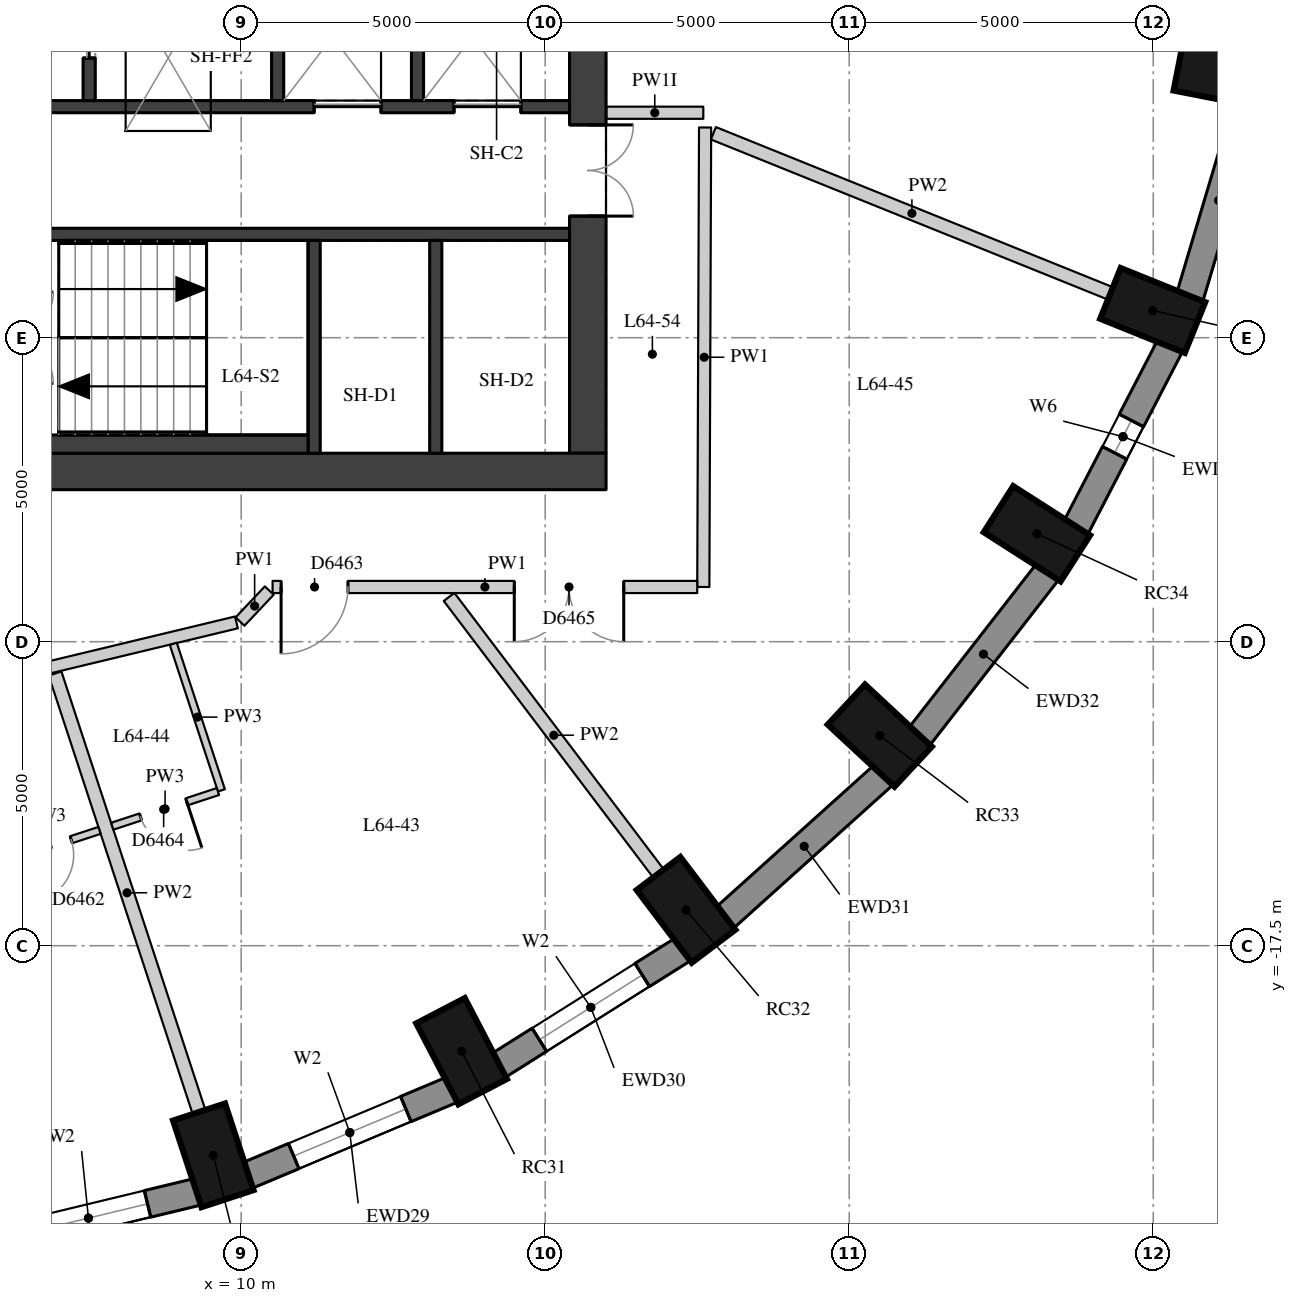
"""IFC4 building model, lengths in metres.
Left out: names, types, materials, properties, quantities, classifications, styles, units other than length and angle.
Written with IfcOpenShell. Run it as: python <this file> out.ifc"""

import sys

from ifc_helpers import new_model, si_unit, direction, frame, frame_2d, origin, origin_2d, place, context, subcontext, project, spatial, rectangle, extrude, element, fill, save


model = new_model("IFC4")
c1 = context("Model", 3, precision=1e-05, world=origin(), true_north=direction((0.0, 1.0)))
c2 = subcontext(c1, "Body", "Model", "MODEL_VIEW")
j1 = project(units=[si_unit("LENGTHUNIT", "METRE"), si_unit("PLANEANGLEUNIT", "RADIAN")], contexts=[c1])
p1 = place(None, origin())
s1 = spatial("IfcSite", under=j1, at=p1, CompositionType="ELEMENT")
p2 = place(p1, origin())
s2 = spatial("IfcBuilding", under=s1, at=p2, CompositionType="ELEMENT")
p3 = place(p2, frame((0.0, 0.0, 225.5)))
s3 = spatial("IfcBuildingStorey", under=s2, at=p3, CompositionType="ELEMENT", Elevation=225.5)
for number, where, z_axis, x_axis in (
    (1, (9.541, -20.948, 0.0), (0.0, 0.0, 1.0), (0.312, -0.95, 0.0)),
    (2, (13.625, -19.235, 0.0), (0.0, 0.0, 1.0), (0.462, -0.887, 0.0)),
    (3, (17.316, -16.911, 0.0), (0.0, 0.0, 1.0), (0.604, -0.797, 0.0)),
    (4, (20.502, -14.045, 0.0), (0.0, 0.0, 1.0), (0.732, -0.681, 0.0)),
    (5, (23.087, -10.725, 0.0), (0.0, 0.0, 1.0), (0.842, -0.539, 0.0)),
    (6, (24.991, -7.052, 0.0), (0.0, 0.0, 1.0), (0.927, -0.374, 0.0)),
    (7, (26.157, -3.137, 0.0), (0.0, 0.0, 1.0), (0.981, -0.192, 0.0)),
):
    element("IfcColumn", number, at=place(p3, frame(where, z_axis=z_axis, x_axis=x_axis)), inside=s3, PredefinedType="COLUMN", context=c2, shape_type="SweptSolid", body=[
        extrude(rectangle(XDim=1.5, YDim=0.9, at=origin_2d()), origin(), (0.0, 0.0, 1.0), 3.3),
    ])
p4 = place(p3, frame((5.691, -22.414, 0.0), z_axis=(0.0, 0.0, 1.0), x_axis=(0.9721584944, 0.234324266275, 0.0)))
e8 = element("IfcWall", 8, at=p4, inside=s3, PredefinedType="SOLIDWALL", context=c2, shape_type="SweptSolid", body=[
    extrude(rectangle(XDim=3.698, YDim=0.45, at=frame_2d((1.849, 0.0))), origin(), (0.0, 0.0, 1.0), 2.85),
])
p5 = place(p4, frame((0.849, 0.0, 0.4)))
e9 = element("IfcOpeningElement", 9, at=p5, cuts=e8, PredefinedType="OPENING", context=c2, shape_type="SweptSolid", body=[
    extrude(rectangle(XDim=2.0, YDim=1.75, at=frame_2d((1.0, 0.875))), frame((0.0, 0.235, 0.0), z_axis=(0.0, -1.0, 0.0), x_axis=(1.0, 0.0, 0.0)), (0.0, 0.0, 1.0), 0.47),
])
p6 = place(p3, frame((10.103, -21.279, 0.0), z_axis=(0.0, 0.0, 1.0), x_axis=(0.922168222612, 0.386789050006, 0.0)))
e10 = element("IfcWall", 10, at=p6, inside=s3, PredefinedType="SOLIDWALL", context=c2, shape_type="SweptSolid", body=[
    extrude(rectangle(XDim=3.651, YDim=0.45, at=frame_2d((1.825, 0.0))), origin(), (0.0, 0.0, 1.0), 2.85),
])
p7 = place(p6, frame((0.825, 0.0, 0.4)))
e11 = element("IfcOpeningElement", 11, at=p7, cuts=e10, PredefinedType="OPENING", context=c2, shape_type="SweptSolid", body=[
    extrude(rectangle(XDim=2.0, YDim=1.75, at=frame_2d((1.0, 0.875))), frame((0.0, 0.235, 0.0), z_axis=(0.0, -1.0, 0.0), x_axis=(1.0, 0.0, 0.0)), (0.0, 0.0, 1.0), 0.47),
])
p8 = place(p3, frame((14.232, -19.47, 0.0), z_axis=(0.0, 0.0, 1.0), x_axis=(0.84614984472, 0.532945063098, 0.0)))
e12 = element("IfcWall", 12, at=p8, inside=s3, PredefinedType="SOLIDWALL", context=c2, shape_type="SweptSolid", body=[
    extrude(rectangle(XDim=3.586, YDim=0.45, at=frame_2d((1.793, 0.0))), origin(), (0.0, 0.0, 1.0), 2.85),
])
p9 = place(p8, frame((0.793, 0.0, 0.4)))
e13 = element("IfcOpeningElement", 13, at=p9, cuts=e12, PredefinedType="OPENING", context=c2, shape_type="SweptSolid", body=[
    extrude(rectangle(XDim=2.0, YDim=1.75, at=frame_2d((1.0, 0.875))), frame((0.0, 0.235, 0.0), z_axis=(0.0, -1.0, 0.0), x_axis=(1.0, 0.0, 0.0)), (0.0, 0.0, 1.0), 0.47),
])
p10 = place(p3, frame((17.953, -17.04, 0.0), z_axis=(0.0, 0.0, 1.0), x_axis=(0.743442727602, 0.668799604348, 0.0)))
e14 = element("IfcWall", 14, at=p10, inside=s3, PredefinedType="SOLIDWALL", context=c2, shape_type="SweptSolid", body=[
    extrude(rectangle(XDim=3.513, YDim=0.45, at=frame_2d((1.756, 0.0))), origin(), (0.0, 0.0, 1.0), 2.85),
])
p11 = place(p3, frame((21.151, -14.061, 0.0), z_axis=(0.0, 0.0, 1.0), x_axis=(0.614255239631, 0.789107407509, 0.0)))
e15 = element("IfcWall", 15, at=p11, inside=s3, PredefinedType="SOLIDWALL", context=c2, shape_type="SweptSolid", body=[
    extrude(rectangle(XDim=3.438, YDim=0.45, at=frame_2d((1.719, 0.0))), origin(), (0.0, 0.0, 1.0), 2.85),
])
p12 = place(p3, frame((23.727, -10.624, 0.0), z_axis=(0.0, 0.0, 1.0), x_axis=(0.460175500475, 0.887827972505, 0.0)))
e16 = element("IfcWall", 16, at=p12, inside=s3, PredefinedType="SOLIDWALL", context=c2, shape_type="SweptSolid", body=[
    extrude(rectangle(XDim=3.371, YDim=0.45, at=frame_2d((1.685, 0.0))), origin(), (0.0, 0.0, 1.0), 2.85),
])
p13 = place(p12, frame((1.385, 0.0, 0.4)))
e17 = element("IfcOpeningElement", 17, at=p13, cuts=e16, PredefinedType="OPENING", context=c2, shape_type="SweptSolid", body=[
    extrude(rectangle(XDim=0.6, YDim=1.75, at=frame_2d((0.3, 0.875))), frame((0.0, 0.235, 0.0), z_axis=(0.0, -1.0, 0.0), x_axis=(1.0, 0.0, 0.0)), (0.0, 0.0, 1.0), 0.47),
])
p14 = place(p3, frame((25.6, -6.834, 0.0), z_axis=(0.0, 0.0, 1.0), x_axis=(0.285444972963, 0.958395099847, 0.0)))
e18 = element("IfcWall", 18, at=p14, inside=s3, PredefinedType="SOLIDWALL", context=c2, shape_type="SweptSolid", body=[
    extrude(rectangle(XDim=3.32, YDim=0.45, at=frame_2d((1.66, 0.0))), origin(), (0.0, 0.0, 1.0), 2.85),
])
p15 = place(p3, frame((15.7, -9.4, 0.0), z_axis=(0.0, 0.0, 1.0), x_axis=(0.0, 1.0, 0.0)))
e19 = element("IfcWall", 19, at=p15, inside=s3, PredefinedType="SHEAR", context=c2, shape_type="SweptSolid", body=[
    extrude(rectangle(XDim=18.8, YDim=0.6, at=frame_2d((9.4, 0.0))), origin(), (0.0, 0.0, 1.0), 2.85),
])
p16 = place(p15, frame((13.4, 0.0, 0.0)))
e20 = element("IfcOpeningElement", 20, at=p16, cuts=e19, PredefinedType="OPENING", context=c2, shape_type="SweptSolid", body=[
    extrude(rectangle(XDim=1.5, YDim=2.1, at=frame_2d((0.75, 1.05))), frame((0.0, 0.31, 0.0), z_axis=(0.0, -1.0, 0.0), x_axis=(1.0, 0.0, 0.0)), (0.0, 0.0, 1.0), 0.62),
])
p17 = place(p15, frame((3.9, 0.0, 0.0)))
e21 = element("IfcOpeningElement", 21, at=p17, cuts=e19, PredefinedType="OPENING", context=c2, shape_type="SweptSolid", body=[
    extrude(rectangle(XDim=1.5, YDim=2.1, at=frame_2d((0.75, 1.05))), frame((0.0, 0.31, 0.0), z_axis=(0.0, -1.0, 0.0), x_axis=(1.0, 0.0, 0.0)), (0.0, 0.0, 1.0), 0.62),
])
p18 = place(p3, frame((4.0, -9.7, 0.0), z_axis=(0.0, 0.0, 1.0), x_axis=(1.0, 0.0, 0.0)))
e22 = element("IfcWall", 22, at=p18, inside=s3, PredefinedType="SHEAR", context=c2, shape_type="SweptSolid", body=[
    extrude(rectangle(XDim=12.0, YDim=0.6, at=frame_2d((6.0, 0.0))), origin(), (0.0, 0.0, 1.0), 2.85),
])
p19 = place(p3, frame((4.6, -3.7, 0.0), z_axis=(0.0, 0.0, 1.0), x_axis=(1.0, 0.0, 0.0)))
e23 = element("IfcWall", 23, at=p19, inside=s3, PredefinedType="SHEAR", context=c2, shape_type="SweptSolid", body=[
    extrude(rectangle(XDim=10.8, YDim=0.2, at=frame_2d((5.4, 0.0))), origin(), (0.0, 0.0, 1.0), 2.85),
])
p20 = place(p19, frame((6.6, 0.0, 0.0)))
e24 = element("IfcOpeningElement", 24, at=p20, cuts=e23, PredefinedType="OPENING", context=c2, shape_type="SweptSolid", body=[
    extrude(rectangle(XDim=1.1, YDim=2.1, at=frame_2d((0.55, 1.05))), frame((0.0, 0.11, 0.0), z_axis=(0.0, -1.0, 0.0), x_axis=(1.0, 0.0, 0.0)), (0.0, 0.0, 1.0), 0.22),
])
p21 = place(p19, frame((8.9, 0.0, 0.0)))
e25 = element("IfcOpeningElement", 25, at=p21, cuts=e23, PredefinedType="OPENING", context=c2, shape_type="SweptSolid", body=[
    extrude(rectangle(XDim=1.1, YDim=2.1, at=frame_2d((0.55, 1.05))), frame((0.0, 0.11, 0.0), z_axis=(0.0, -1.0, 0.0), x_axis=(1.0, 0.0, 0.0)), (0.0, 0.0, 1.0), 0.22),
])
p22 = place(p3, frame((4.6, -5.8, 0.0), z_axis=(0.0, 0.0, 1.0), x_axis=(1.0, 0.0, 0.0)))
e26 = element("IfcWall", 26, at=p22, inside=s3, PredefinedType="SHEAR", context=c2, shape_type="SweptSolid", body=[
    extrude(rectangle(XDim=10.8, YDim=0.2, at=frame_2d((5.4, 0.0))), origin(), (0.0, 0.0, 1.0), 2.85),
])
for number, where, z_axis, x_axis in (
    (27, (11.2, -9.4, 0.0), (0.0, 0.0, 1.0), (0.0, 1.0, 0.0)),
    (28, (13.2, -9.4, 0.0), (0.0, 0.0, 1.0), (0.0, 1.0, 0.0)),
):
    element("IfcWall", number, at=place(p3, frame(where, z_axis=z_axis, x_axis=x_axis)), inside=s3, PredefinedType="SHEAR", context=c2, shape_type="SweptSolid", body=[
        extrude(rectangle(XDim=3.5, YDim=0.2, at=frame_2d((1.75, 0.0))), origin(), (0.0, 0.0, 1.0), 2.85),
    ])
p23 = place(p3, frame((7.5, -3.6, 0.0), z_axis=(0.0, 0.0, 1.0), x_axis=(0.0, 1.0, 0.0)))
e29 = element("IfcWall", 29, at=p23, inside=s3, PredefinedType="SHEAR", context=c2, shape_type="SweptSolid", body=[
    extrude(rectangle(XDim=2.5, YDim=0.2, at=frame_2d((1.25, 0.0))), origin(), (0.0, 0.0, 1.0), 2.85),
])
p24 = place(p23, frame((0.7, 0.0, 0.0)))
e30 = element("IfcOpeningElement", 30, at=p24, cuts=e29, PredefinedType="OPENING", context=c2, shape_type="SweptSolid", body=[
    extrude(rectangle(XDim=1.1, YDim=2.1, at=frame_2d((0.55, 1.05))), frame((0.0, 0.11, 0.0), z_axis=(0.0, -1.0, 0.0), x_axis=(1.0, 0.0, 0.0)), (0.0, 0.0, 1.0), 0.22),
])
for number, where, z_axis, x_axis in (
    (31, (10.6, -3.6, 0.0), (0.0, 0.0, 1.0), (0.0, 1.0, 0.0)),
    (32, (12.9, -3.6, 0.0), (0.0, 0.0, 1.0), (0.0, 1.0, 0.0)),
):
    element("IfcWall", number, at=place(p3, frame(where, z_axis=z_axis, x_axis=x_axis)), inside=s3, PredefinedType="SHEAR", context=c2, shape_type="SweptSolid", body=[
        extrude(rectangle(XDim=2.5, YDim=0.2, at=frame_2d((1.25, 0.0))), origin(), (0.0, 0.0, 1.0), 2.85),
    ])
p25 = place(p3, frame((6.22, -9.25, 0.0), z_axis=(0.0, 0.0, 1.0), x_axis=(1.0, 0.0, 0.0)))
e33 = element("IfcWall", 33, at=p25, inside=s3, PredefinedType="PARTITIONING", context=c2, shape_type="SweptSolid", body=[
    extrude(rectangle(XDim=4.88, YDim=0.3, at=frame_2d((2.44, 0.0))), origin(), (0.0, 0.0, 1.0), 2.85),
])
p26 = place(p3, frame((17.63, -4.043, 0.0), z_axis=(0.0, 0.0, 1.0), x_axis=(-0.003908870153, -0.999992360338, 0.0)))
e34 = element("IfcWall", 34, at=p26, inside=s3, PredefinedType="PARTITIONING", context=c2, shape_type="SweptSolid", body=[
    extrude(rectangle(XDim=7.557, YDim=0.2, at=frame_2d((3.779, 0.0))), origin(), (0.0, 0.0, 1.0), 2.85),
])
p27 = place(p3, frame((17.5, -11.6, 0.0), z_axis=(0.0, 0.0, 1.0), x_axis=(-1.0, 0.0, 0.0)))
e35 = element("IfcWall", 35, at=p27, inside=s3, PredefinedType="PARTITIONING", context=c2, shape_type="SweptSolid", body=[
    extrude(rectangle(XDim=6.983, YDim=0.2, at=frame_2d((3.492, 0.0))), origin(), (0.0, 0.0, 1.0), 2.85),
])
p28 = place(p27, frame((5.743, 0.0, 0.0)))
e36 = element("IfcOpeningElement", 36, at=p28, cuts=e35, PredefinedType="OPENING", context=c2, shape_type="SweptSolid", body=[
    extrude(rectangle(XDim=1.1, YDim=2.1, at=frame_2d((0.55, 1.05))), frame((0.0, 0.11, 0.0), z_axis=(0.0, -1.0, 0.0), x_axis=(1.0, 0.0, 0.0)), (0.0, 0.0, 1.0), 0.22),
])
p29 = place(p27, frame((1.208, 0.0, 0.0)))
e37 = element("IfcOpeningElement", 37, at=p29, cuts=e35, PredefinedType="OPENING", context=c2, shape_type="SweptSolid", body=[
    extrude(rectangle(XDim=1.8, YDim=2.1, at=frame_2d((0.9, 1.05))), frame((0.0, 0.11, 0.0), z_axis=(0.0, -1.0, 0.0), x_axis=(1.0, 0.0, 0.0)), (0.0, 0.0, 1.0), 0.22),
])
p30 = place(p3, frame((10.462, -11.659, 0.0), z_axis=(0.0, 0.0, 1.0), x_axis=(-0.686265612426, -0.727351021998, 0.0)))
e38 = element("IfcWall", 38, at=p30, inside=s3, PredefinedType="PARTITIONING", context=c2, shape_type="SweptSolid", body=[
    extrude(rectangle(XDim=0.701, YDim=0.2, at=frame_2d((0.351, 0.0))), origin(), (0.0, 0.0, 1.0), 2.85),
])
p31 = place(p3, frame((9.922, -12.183, 0.0), z_axis=(0.0, 0.0, 1.0), x_axis=(-0.972292362394, -0.233768180104, 0.0)))
e39 = element("IfcWall", 39, at=p31, inside=s3, PredefinedType="PARTITIONING", context=c2, shape_type="SweptSolid", body=[
    extrude(rectangle(XDim=9.485, YDim=0.2, at=frame_2d((4.742, 0.0))), origin(), (0.0, 0.0, 1.0), 2.25),
])
p32 = place(p31, frame((8.245, 0.0, 0.0)))
e40 = element("IfcOpeningElement", 40, at=p32, cuts=e39, PredefinedType="OPENING", context=c2, shape_type="SweptSolid", body=[
    extrude(rectangle(XDim=1.1, YDim=2.1, at=frame_2d((0.55, 1.05))), frame((0.0, 0.11, 0.0), z_axis=(0.0, -1.0, 0.0), x_axis=(1.0, 0.0, 0.0)), (0.0, 0.0, 1.0), 0.22),
])
p33 = place(p3, frame((16.004, -3.8, 0.0), z_axis=(0.0, 0.0, 1.0), x_axis=(1.0, 0.0, 0.0)))
e41 = element("IfcWall", 41, at=p33, inside=s3, PredefinedType="PARTITIONING", context=c2, shape_type="SweptSolid", body=[
    extrude(rectangle(XDim=1.596, YDim=0.2, at=frame_2d((0.798, 0.0))), origin(), (0.0, 0.0, 1.0), 2.3),
])
p34 = place(p3, frame((9.307, -20.235, 0.0), z_axis=(0.0, 0.0, 1.0), x_axis=(-0.311979110549, 0.950088961404, 0.0)))
e42 = element("IfcWall", 42, at=p34, inside=s3, PredefinedType="PARTITIONING", context=c2, shape_type="SweptSolid", body=[
    extrude(rectangle(XDim=7.591, YDim=0.22, at=frame_2d((3.795, 0.0))), origin(), (0.0, 0.0, 1.0), 2.85),
])
p35 = place(p3, frame((16.863, -16.312, 0.0), z_axis=(0.0, 0.0, 1.0), x_axis=(-0.603636051313, 0.797260006243, 0.0)))
e43 = element("IfcWall", 43, at=p35, inside=s3, PredefinedType="PARTITIONING", context=c2, shape_type="SweptSolid", body=[
    extrude(rectangle(XDim=5.706, YDim=0.22, at=frame_2d((2.853, 0.0))), origin(), (0.0, 0.0, 1.0), 2.85),
])
p36 = place(p3, frame((24.295, -6.771, 0.0), z_axis=(0.0, 0.0, 1.0), x_axis=(-0.927386950843, 0.374103519639, 0.0)))
e44 = element("IfcWall", 44, at=p36, inside=s3, PredefinedType="PARTITIONING", context=c2, shape_type="SweptSolid", body=[
    extrude(rectangle(XDim=7.04, YDim=0.22, at=frame_2d((3.52, 0.0))), origin(), (0.0, 0.0, 1.0), 2.85),
])
p37 = place(p3, frame((8.884, -12.535, 0.0), z_axis=(0.0, 0.0, 1.0), x_axis=(0.312037873477, -0.950069663507, 0.0)))
e45 = element("IfcWall", 45, at=p37, inside=s3, PredefinedType="PARTITIONING", context=c2, shape_type="SweptSolid", body=[
    extrude(rectangle(XDim=2.537, YDim=0.12, at=frame_2d((1.268, 0.0))), origin(), (0.0, 0.0, 1.0), 2.85),
])
p38 = place(p3, frame((5.932, -16.174, 0.0), z_axis=(0.0, 0.0, 1.0), x_axis=(0.950140787885, 0.311821235962, 0.0)))
e46 = element("IfcWall", 46, at=p38, inside=s3, PredefinedType="PARTITIONING", context=c2, shape_type="SweptSolid", body=[
    extrude(rectangle(XDim=1.83, YDim=0.12, at=frame_2d((0.915, 0.0))), origin(), (0.0, 0.0, 1.0), 2.85),
])
p39 = place(p38, frame((0.54, 0.0, 0.0)))
e47 = element("IfcOpeningElement", 47, at=p39, cuts=e46, PredefinedType="OPENING", context=c2, shape_type="SweptSolid", body=[
    extrude(rectangle(XDim=0.8, YDim=2.1, at=frame_2d((0.4, 1.05))), frame((0.0, 0.07, 0.0), z_axis=(0.0, -1.0, 0.0), x_axis=(1.0, 0.0, 0.0)), (0.0, 0.0, 1.0), 0.14),
])
p40 = place(p3, frame((9.618, -14.964, 0.0), z_axis=(0.0, 0.0, 1.0), x_axis=(-0.950140787885, -0.311821235962, 0.0)))
e48 = element("IfcWall", 48, at=p40, inside=s3, PredefinedType="PARTITIONING", context=c2, shape_type="SweptSolid", body=[
    extrude(rectangle(XDim=1.83, YDim=0.12, at=frame_2d((0.915, 0.0))), origin(), (0.0, 0.0, 1.0), 2.85),
])
p41 = place(p40, frame((0.54, 0.0, 0.0)))
e49 = element("IfcOpeningElement", 49, at=p41, cuts=e48, PredefinedType="OPENING", context=c2, shape_type="SweptSolid", body=[
    extrude(rectangle(XDim=0.8, YDim=2.1, at=frame_2d((0.4, 1.05))), frame((0.0, 0.07, 0.0), z_axis=(0.0, -1.0, 0.0), x_axis=(1.0, 0.0, 0.0)), (0.0, 0.0, 1.0), 0.14),
])
p42 = place(p5, origin())
e50 = element("IfcWindow", 50, at=p42, inside=s3, PartitioningType="SINGLE_PANEL", PredefinedType="WINDOW", context=c2, shape_type="SweptSolid", body=[
    extrude(rectangle(XDim=2.0, YDim=1.75, at=frame_2d((1.0, 0.875))), frame((0.0, 0.035, 0.0), z_axis=(0.0, -1.0, 0.0), x_axis=(1.0, 0.0, 0.0)), (0.0, 0.0, 1.0), 0.06),
])
fill(e9, e50)
p43 = place(p7, origin())
e51 = element("IfcWindow", 51, at=p43, inside=s3, PartitioningType="SINGLE_PANEL", PredefinedType="WINDOW", context=c2, shape_type="SweptSolid", body=[
    extrude(rectangle(XDim=2.0, YDim=1.75, at=frame_2d((1.0, 0.875))), frame((0.0, 0.035, 0.0), z_axis=(0.0, -1.0, 0.0), x_axis=(1.0, 0.0, 0.0)), (0.0, 0.0, 1.0), 0.06),
])
fill(e11, e51)
p44 = place(p9, origin())
e52 = element("IfcWindow", 52, at=p44, inside=s3, PartitioningType="SINGLE_PANEL", PredefinedType="WINDOW", context=c2, shape_type="SweptSolid", body=[
    extrude(rectangle(XDim=2.0, YDim=1.75, at=frame_2d((1.0, 0.875))), frame((0.0, 0.035, 0.0), z_axis=(0.0, -1.0, 0.0), x_axis=(1.0, 0.0, 0.0)), (0.0, 0.0, 1.0), 0.06),
])
fill(e13, e52)
p45 = place(p13, origin())
e53 = element("IfcWindow", 53, at=p45, inside=s3, PartitioningType="SINGLE_PANEL", PredefinedType="WINDOW", context=c2, shape_type="SweptSolid", body=[
    extrude(rectangle(XDim=0.6, YDim=1.75, at=frame_2d((0.3, 0.875))), frame((0.0, 0.035, 0.0), z_axis=(0.0, -1.0, 0.0), x_axis=(1.0, 0.0, 0.0)), (0.0, 0.0, 1.0), 0.06),
])
fill(e17, e53)
p46 = place(p17, origin())
e54 = element("IfcDoor", 54, at=p46, inside=s3, OperationType="DOUBLE_DOOR_SINGLE_SWING", PredefinedType="DOOR", context=c2, shape_type="SweptSolid", body=[
    extrude(rectangle(XDim=1.5, YDim=2.1, at=frame_2d((0.75, 1.05))), frame((0.0, 0.025, 0.0), z_axis=(0.0, -1.0, 0.0), x_axis=(1.0, 0.0, 0.0)), (0.0, 0.0, 1.0), 0.05),
])
fill(e21, e54)
p47 = place(p20, origin())
e55 = element("IfcDoor", 55, at=p47, inside=s3, OperationType="DOUBLE_DOOR_SLIDING", PredefinedType="DOOR", context=c2, shape_type="SweptSolid", body=[
    extrude(rectangle(XDim=1.1, YDim=2.1, at=frame_2d((0.55, 1.05))), frame((0.0, 0.025, 0.0), z_axis=(0.0, -1.0, 0.0), x_axis=(1.0, 0.0, 0.0)), (0.0, 0.0, 1.0), 0.05),
])
fill(e24, e55)
p48 = place(p21, origin())
e56 = element("IfcDoor", 56, at=p48, inside=s3, OperationType="DOUBLE_DOOR_SLIDING", PredefinedType="DOOR", context=c2, shape_type="SweptSolid", body=[
    extrude(rectangle(XDim=1.1, YDim=2.1, at=frame_2d((0.55, 1.05))), frame((0.0, 0.025, 0.0), z_axis=(0.0, -1.0, 0.0), x_axis=(1.0, 0.0, 0.0)), (0.0, 0.0, 1.0), 0.05),
])
fill(e25, e56)
p49 = place(p24, origin())
e57 = element("IfcDoor", 57, at=p49, inside=s3, OperationType="DOUBLE_DOOR_SLIDING", PredefinedType="DOOR", context=c2, shape_type="SweptSolid", body=[
    extrude(rectangle(XDim=1.1, YDim=2.1, at=frame_2d((0.55, 1.05))), frame((0.0, 0.025, 0.0), z_axis=(0.0, -1.0, 0.0), x_axis=(1.0, 0.0, 0.0)), (0.0, 0.0, 1.0), 0.05),
])
fill(e30, e57)
p50 = place(p39, origin())
e58 = element("IfcDoor", 58, at=p50, inside=s3, OperationType="SINGLE_SWING_RIGHT", PredefinedType="DOOR", context=c2, shape_type="SweptSolid", body=[
    extrude(rectangle(XDim=0.8, YDim=2.1, at=frame_2d((0.4, 1.05))), frame((0.0, 0.025, 0.0), z_axis=(0.0, -1.0, 0.0), x_axis=(1.0, 0.0, 0.0)), (0.0, 0.0, 1.0), 0.05),
])
fill(e47, e58)
p51 = place(p28, origin())
e59 = element("IfcDoor", 59, at=p51, inside=s3, OperationType="SINGLE_SWING_RIGHT", PredefinedType="DOOR", context=c2, shape_type="SweptSolid", body=[
    extrude(rectangle(XDim=1.1, YDim=2.1, at=frame_2d((0.55, 1.05))), frame((0.0, 0.025, 0.0), z_axis=(0.0, -1.0, 0.0), x_axis=(1.0, 0.0, 0.0)), (0.0, 0.0, 1.0), 0.05),
])
fill(e36, e59)
p52 = place(p41, origin())
e60 = element("IfcDoor", 60, at=p52, inside=s3, OperationType="SINGLE_SWING_LEFT", PredefinedType="DOOR", context=c2, shape_type="SweptSolid", body=[
    extrude(rectangle(XDim=0.8, YDim=2.1, at=frame_2d((0.4, 1.05))), frame((0.0, 0.025, 0.0), z_axis=(0.0, -1.0, 0.0), x_axis=(1.0, 0.0, 0.0)), (0.0, 0.0, 1.0), 0.05),
])
fill(e49, e60)
p53 = place(p29, origin())
e61 = element("IfcDoor", 61, at=p53, inside=s3, OperationType="DOUBLE_DOOR_SINGLE_SWING", PredefinedType="DOOR", context=c2, shape_type="SweptSolid", body=[
    extrude(rectangle(XDim=1.8, YDim=2.1, at=frame_2d((0.9, 1.05))), frame((0.0, 0.025, 0.0), z_axis=(0.0, -1.0, 0.0), x_axis=(1.0, 0.0, 0.0)), (0.0, 0.0, 1.0), 0.05),
])
fill(e37, e61)
save(model, sys.argv[1])
